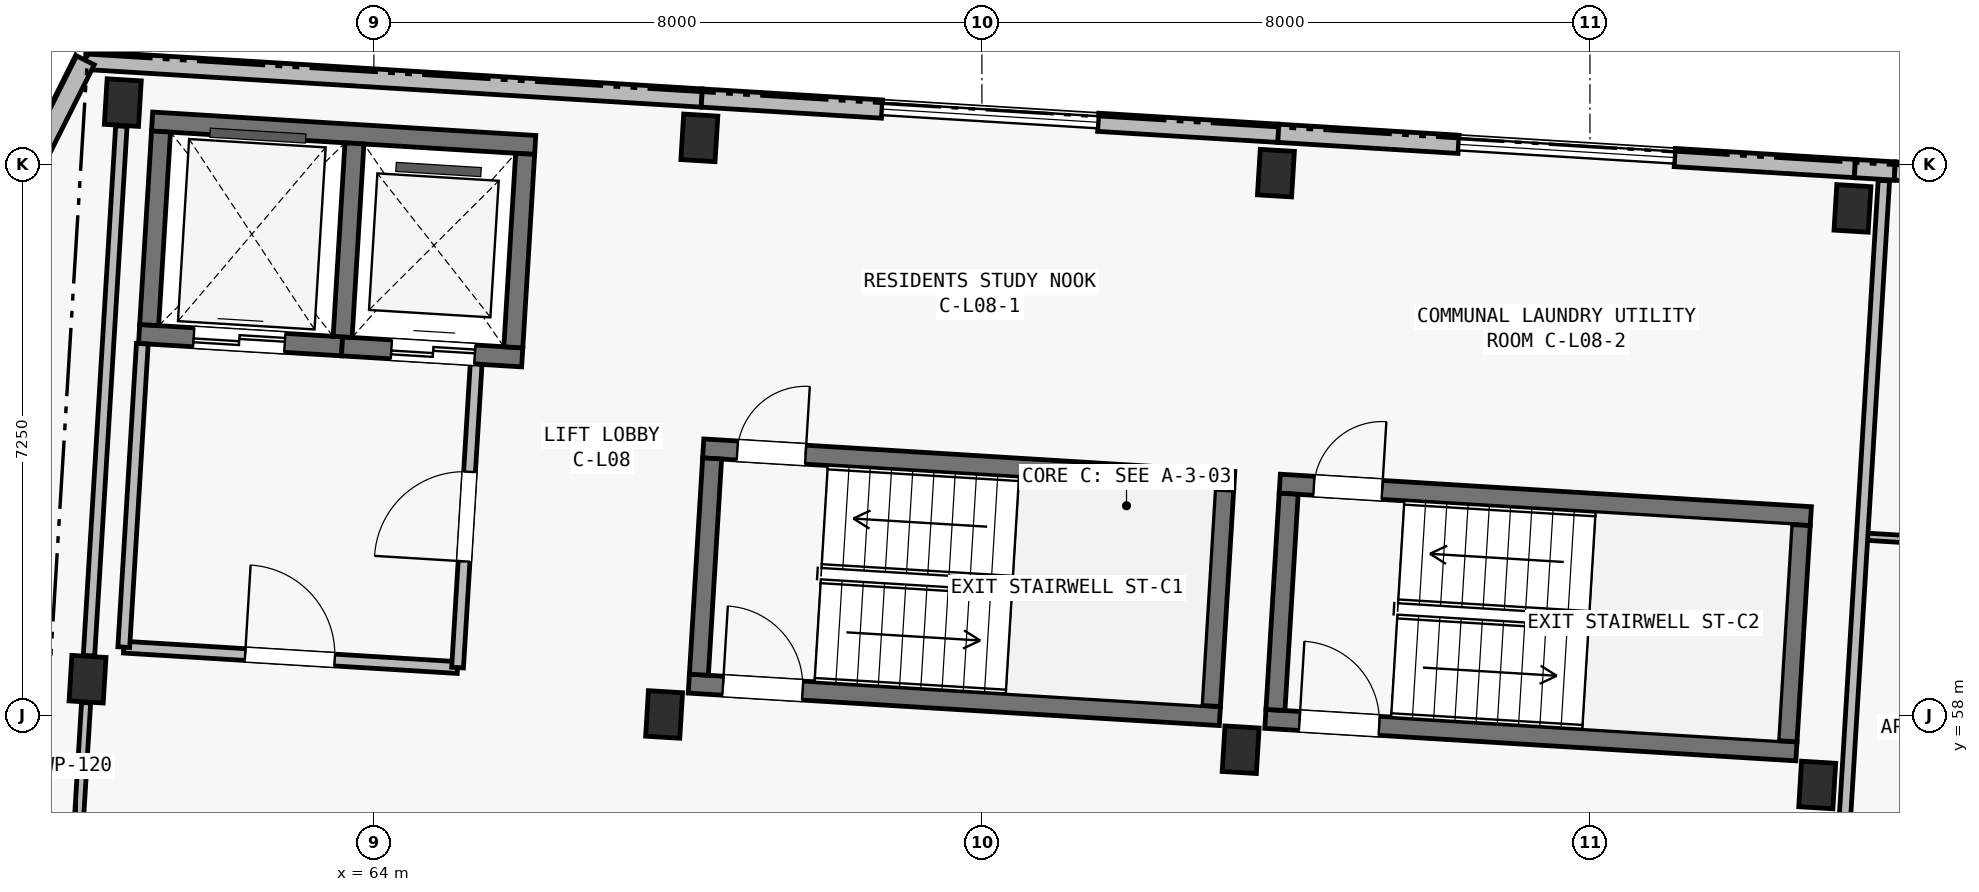
"""IFC4 building model, lengths in metres.
Left out: names, types, materials, properties, quantities, classifications, styles, units other than length and angle.
Written with IfcOpenShell. Run it as: python <this file> out.ifc"""

import sys

from ifc_helpers import new_model, si_unit, direction, frame, frame_2d, origin, origin_2d, place, context, subcontext, project, spatial, polyline, rectangle, outline, extrude, element, fill, save


model = new_model("IFC4")
c1 = context("Model", 3, precision=1e-05, world=origin(), true_north=direction((0.0, 1.0)))
c2 = subcontext(c1, "Body", "Model", "MODEL_VIEW")
j1 = project(units=[si_unit("LENGTHUNIT", "METRE"), si_unit("PLANEANGLEUNIT", "RADIAN")], contexts=[c1])
p1 = place(None, origin())
s1 = spatial("IfcSite", under=j1, at=p1, CompositionType="ELEMENT")
p2 = place(p1, origin())
s2 = spatial("IfcBuilding", under=s1, at=p2, CompositionType="ELEMENT")
p3 = place(p2, frame((0.0, 0.0, 27.9)))
s3 = spatial("IfcBuildingStorey", under=s2, at=p3, CompositionType="ELEMENT", Elevation=27.9)
for number, where, z_axis, x_axis in (
    (1, (60.233, 58.478, 0.0), (0.0, 0.0, 1.0), (0.998, -0.061, 0.0)),
    (2, (60.697, 66.063, 0.0), (0.0, 0.0, 1.0), (0.998, -0.061, 0.0)),
    (3, (67.818, 58.014, 0.0), (0.0, 0.0, 1.0), (0.998, -0.061, 0.0)),
    (4, (68.282, 65.599, 0.0), (0.0, 0.0, 1.0), (0.998, -0.061, 0.0)),
    (5, (75.404, 57.55, 0.0), (0.0, 0.0, 1.0), (0.998, -0.061, 0.0)),
    (6, (75.868, 65.135, 0.0), (0.0, 0.0, 1.0), (0.998, -0.061, 0.0)),
    (7, (82.99, 57.086, 0.0), (0.0, 0.0, 1.0), (0.998, -0.061, 0.0)),
    (8, (83.454, 64.672, 0.0), (0.0, 0.0, 1.0), (0.998, -0.061, 0.0)),
):
    element("IfcColumn", number, at=place(p3, frame(where, z_axis=z_axis, x_axis=x_axis)), inside=s3, PredefinedType="COLUMN", context=c2, shape_type="SweptSolid", body=[
        extrude(rectangle(XDim=0.45, YDim=0.6, at=origin_2d()), origin(), (0.0, 0.0, 1.0), 3.25),
    ])
p4 = place(p3, frame((61.082, 65.814, 0.0), z_axis=(0.0, 0.0, 1.0), x_axis=(0.998134101522, -0.061059932685, 0.0)))
e9 = element("IfcWall", 9, at=p4, inside=s3, PredefinedType="SHEAR", context=c2, shape_type="SweptSolid", body=[
    extrude(rectangle(XDim=5.05, YDim=0.25, at=frame_2d((2.525, 0.0))), origin(), (0.0, 0.0, 1.0), 3.25),
])
p5 = place(p3, frame((60.911, 63.02, 0.0), z_axis=(0.0, 0.0, 1.0), x_axis=(0.998134099905, -0.061059959111, 0.0)))
e10 = element("IfcWall", 10, at=p5, inside=s3, PredefinedType="SHEAR", context=c2, shape_type="SweptSolid", body=[
    extrude(rectangle(XDim=2.675, YDim=0.25, at=frame_2d((1.337, 0.0))), origin(), (0.0, 0.0, 1.0), 3.25),
])
p6 = place(p5, frame((0.72, 0.0, 0.0)))
e11 = element("IfcOpeningElement", 11, at=p6, cuts=e10, PredefinedType="OPENING", context=c2, shape_type="SweptSolid", body=[
    extrude(rectangle(XDim=1.2, YDim=2.2, at=frame_2d((0.6, 1.1))), frame((0.0, 0.14, 0.0), z_axis=(0.0, -1.0, 0.0), x_axis=(1.0, 0.0, 0.0)), (0.0, 0.0, 1.0), 0.28),
])
p7 = place(p3, frame((63.581, 62.856, 0.0), z_axis=(0.0, 0.0, 1.0), x_axis=(0.998134103342, -0.061059902923, 0.0)))
e12 = element("IfcWall", 12, at=p7, inside=s3, PredefinedType="SHEAR", context=c2, shape_type="SweptSolid", body=[
    extrude(rectangle(XDim=2.375, YDim=0.25, at=frame_2d((1.188, 0.0))), origin(), (0.0, 0.0, 1.0), 3.25),
])
p8 = place(p7, frame((0.65, 0.0, 0.0)))
e13 = element("IfcOpeningElement", 13, at=p8, cuts=e12, PredefinedType="OPENING", context=c2, shape_type="SweptSolid", body=[
    extrude(rectangle(XDim=1.1, YDim=2.15, at=frame_2d((0.55, 1.075))), frame((0.0, 0.14, 0.0), z_axis=(0.0, -1.0, 0.0), x_axis=(1.0, 0.0, 0.0)), (0.0, 0.0, 1.0), 0.28),
])
p9 = place(p3, frame((61.043, 63.137, 0.0), z_axis=(0.0, 0.0, 1.0), x_axis=(0.061078919587, 0.998132939834, 0.0)))
e14 = element("IfcWall", 14, at=p9, inside=s3, PredefinedType="SHEAR", context=c2, shape_type="SweptSolid", body=[
    extrude(rectangle(XDim=2.55, YDim=0.25, at=frame_2d((1.275, 0.0))), origin(), (0.0, 0.0, 1.0), 3.25),
])
p10 = place(p3, frame((63.589, 62.981, 0.0), z_axis=(0.0, 0.0, 1.0), x_axis=(0.060989368901, 0.998138415692, 0.0)))
e15 = element("IfcWall", 15, at=p10, inside=s3, PredefinedType="SHEAR", context=c2, shape_type="SweptSolid", body=[
    extrude(rectangle(XDim=2.55, YDim=0.25, at=frame_2d((1.275, 0.0))), origin(), (0.0, 0.0, 1.0), 3.25),
])
p11 = place(p3, frame((65.834, 62.844, 0.0), z_axis=(0.0, 0.0, 1.0), x_axis=(0.061084756616, 0.998132582631, 0.0)))
e16 = element("IfcWall", 16, at=p11, inside=s3, PredefinedType="SHEAR", context=c2, shape_type="SweptSolid", body=[
    extrude(rectangle(XDim=2.55, YDim=0.25, at=frame_2d((1.275, 0.0))), origin(), (0.0, 0.0, 1.0), 3.25),
])
p12 = place(p3, frame((68.333, 61.514, 0.0), z_axis=(0.0, 0.0, 1.0), x_axis=(0.998135676081, -0.061034188237, 0.0)))
e17 = element("IfcWall", 17, at=p12, inside=s3, PredefinedType="SHEAR", context=c2, shape_type="SweptSolid", body=[
    extrude(rectangle(XDim=7.0, YDim=0.25, at=frame_2d((3.5, 0.0))), origin(), (0.0, 0.0, 1.0), 3.25),
])
p13 = place(p12, frame((0.45, 0.0, 0.0)))
e18 = element("IfcOpeningElement", 18, at=p13, cuts=e17, PredefinedType="OPENING", context=c2, shape_type="SweptSolid", body=[
    extrude(rectangle(XDim=0.9, YDim=2.1, at=frame_2d((0.45, 1.05))), frame((0.0, 0.14, 0.0), z_axis=(0.0, -1.0, 0.0), x_axis=(1.0, 0.0, 0.0)), (0.0, 0.0, 1.0), 0.28),
])
p14 = place(p3, frame((68.144, 58.419, 0.0), z_axis=(0.0, 0.0, 1.0), x_axis=(0.998135546153, -0.061036313012, 0.0)))
e19 = element("IfcWall", 19, at=p14, inside=s3, PredefinedType="SHEAR", context=c2, shape_type="SweptSolid", body=[
    extrude(rectangle(XDim=7.0, YDim=0.25, at=frame_2d((3.5, 0.0))), origin(), (0.0, 0.0, 1.0), 3.25),
])
p15 = place(p14, frame((0.45, 0.0, 0.0)))
e20 = element("IfcOpeningElement", 20, at=p15, cuts=e19, PredefinedType="OPENING", context=c2, shape_type="SweptSolid", body=[
    extrude(rectangle(XDim=1.05, YDim=2.15, at=frame_2d((0.525, 1.075))), frame((0.0, 0.14, 0.0), z_axis=(0.0, -1.0, 0.0), x_axis=(1.0, 0.0, 0.0)), (0.0, 0.0, 1.0), 0.28),
])
for number, where, z_axis, x_axis in (
    (21, (68.276, 58.537, 0.0), (0.0, 0.0, 1.0), (0.061, 0.998, 0.0)),
    (22, (75.014, 58.125, 0.0), (0.0, 0.0, 1.0), (0.061, 0.998, 0.0)),
):
    element("IfcWall", number, at=place(p3, frame(where, z_axis=z_axis, x_axis=x_axis)), inside=s3, PredefinedType="SHEAR", context=c2, shape_type="SweptSolid", body=[
        extrude(rectangle(XDim=2.85, YDim=0.25, at=frame_2d((1.425, 0.0))), origin(), (0.0, 0.0, 1.0), 3.25),
    ])
p16 = place(p3, frame((75.919, 61.05, 0.0), z_axis=(0.0, 0.0, 1.0), x_axis=(0.998135546153, -0.061036313012, 0.0)))
e23 = element("IfcWall", 23, at=p16, inside=s3, PredefinedType="SHEAR", context=c2, shape_type="SweptSolid", body=[
    extrude(rectangle(XDim=7.0, YDim=0.25, at=frame_2d((3.5, 0.0))), origin(), (0.0, 0.0, 1.0), 3.25),
])
p17 = place(p16, frame((0.45, 0.0, 0.0)))
e24 = element("IfcOpeningElement", 24, at=p17, cuts=e23, PredefinedType="OPENING", context=c2, shape_type="SweptSolid", body=[
    extrude(rectangle(XDim=0.9, YDim=2.1, at=frame_2d((0.45, 1.05))), frame((0.0, 0.14, 0.0), z_axis=(0.0, -1.0, 0.0), x_axis=(1.0, 0.0, 0.0)), (0.0, 0.0, 1.0), 0.28),
])
p18 = place(p3, frame((75.73, 57.956, 0.0), z_axis=(0.0, 0.0, 1.0), x_axis=(0.998135546153, -0.061036313012, 0.0)))
e25 = element("IfcWall", 25, at=p18, inside=s3, PredefinedType="SHEAR", context=c2, shape_type="SweptSolid", body=[
    extrude(rectangle(XDim=7.0, YDim=0.25, at=frame_2d((3.5, 0.0))), origin(), (0.0, 0.0, 1.0), 3.25),
])
p19 = place(p18, frame((0.45, 0.0, 0.0)))
e26 = element("IfcOpeningElement", 26, at=p19, cuts=e25, PredefinedType="OPENING", context=c2, shape_type="SweptSolid", body=[
    extrude(rectangle(XDim=1.05, YDim=2.15, at=frame_2d((0.525, 1.075))), frame((0.0, 0.14, 0.0), z_axis=(0.0, -1.0, 0.0), x_axis=(1.0, 0.0, 0.0)), (0.0, 0.0, 1.0), 0.28),
])
for number, where, z_axis, x_axis in (
    (27, (75.862, 58.073, 0.0), (0.0, 0.0, 1.0), (0.061, 0.998, 0.0)),
    (28, (82.599, 57.661, 0.0), (0.0, 0.0, 1.0), (0.061, 0.998, 0.0)),
):
    element("IfcWall", number, at=place(p3, frame(where, z_axis=z_axis, x_axis=x_axis)), inside=s3, PredefinedType="SHEAR", context=c2, shape_type="SweptSolid", body=[
        extrude(rectangle(XDim=2.85, YDim=0.25, at=frame_2d((1.425, 0.0))), origin(), (0.0, 0.0, 1.0), 3.25),
    ])
p20 = place(p3, frame((60.205, 66.62, 0.0), z_axis=(0.0, 0.0, 1.0), x_axis=(0.998134248939, -0.061057522844, 0.0)))
e29 = element("IfcWall", 29, at=p20, inside=s3, PredefinedType="SOLIDWALL", context=c2, shape_type="SweptSolid", body=[
    extrude(rectangle(XDim=8.125, YDim=0.24, at=frame_2d((4.062, 0.0))), origin(), (0.0, 0.0, 1.0), 3.0),
])
p21 = place(p3, frame((68.314, 66.124, 0.0), z_axis=(0.0, 0.0, 1.0), x_axis=(0.998134103342, -0.061059902923, 0.0)))
e30 = element("IfcWall", 30, at=p21, inside=s3, PredefinedType="SOLIDWALL", context=c2, shape_type="SweptSolid", body=[
    extrude(rectangle(XDim=2.375, YDim=0.24, at=frame_2d((1.188, 0.0))), origin(), (0.0, 0.0, 1.0), 3.0),
])
p22 = place(p3, frame((73.53, 65.804, 0.0), z_axis=(0.0, 0.0, 1.0), x_axis=(0.998133720034, -0.061066168473, 0.0)))
e31 = element("IfcWall", 31, at=p22, inside=s3, PredefinedType="SOLIDWALL", context=c2, shape_type="SweptSolid", body=[
    extrude(rectangle(XDim=2.375, YDim=0.24, at=frame_2d((1.188, 0.0))), origin(), (0.0, 0.0, 1.0), 3.0),
])
for number, where, z_axis, x_axis in (
    (32, (75.9, 65.659, 0.0), (0.0, 0.0, 1.0), (0.998, -0.061, 0.0)),
    (33, (81.115, 65.341, 0.0), (0.0, 0.0, 1.0), (0.998, -0.061, 0.0)),
):
    element("IfcWall", number, at=place(p3, frame(where, z_axis=z_axis, x_axis=x_axis)), inside=s3, PredefinedType="SOLIDWALL", context=c2, shape_type="SweptSolid", body=[
        extrude(rectangle(XDim=2.375, YDim=0.24, at=frame_2d((1.188, 0.0))), origin(), (0.0, 0.0, 1.0), 3.0),
    ])
p23 = place(p3, frame((83.486, 65.196, 0.0), z_axis=(0.0, 0.0, 1.0), x_axis=(0.998142018096, -0.060930384143, 0.0)))
e34 = element("IfcWall", 34, at=p23, inside=s3, PredefinedType="SOLIDWALL", context=c2, shape_type="SweptSolid", body=[
    extrude(rectangle(XDim=0.525, YDim=0.24, at=frame_2d((0.262, 0.0))), origin(), (0.0, 0.0, 1.0), 3.0),
])
p24 = place(p3, frame((84.01, 65.164, 0.0), z_axis=(0.0, 0.0, 1.0), x_axis=(0.998135197798, -0.061042009435, 0.0)))
e35 = element("IfcWall", 35, at=p24, inside=s3, PredefinedType="SOLIDWALL", context=c2, shape_type="SweptSolid", body=[
    extrude(outline(polyline([(0.0, 0.0), (7.075, 0.0), (7.075, 4.861), (0.0, 6.222), (0.0, 0.0)])), frame((0.0, 0.12, 0.0), z_axis=(0.0, -1.0, 0.0), x_axis=(1.0, 0.0, 0.0)), (0.0, 0.0, 1.0), 0.24),
])
p25 = place(p24, frame((1.282, 0.0, 0.5)))
e36 = element("IfcOpeningElement", 36, at=p25, cuts=e35, PredefinedType="OPENING", context=c2, shape_type="SweptSolid", body=[
    extrude(rectangle(XDim=0.74, YDim=2.26, at=frame_2d((0.37, 1.13))), frame((0.0, 0.135, 0.0), z_axis=(0.0, -1.0, 0.0), x_axis=(1.0, 0.0, 0.0)), (0.0, 0.0, 1.0), 0.27),
])
p26 = place(p24, frame((4.481, 0.0, 0.44)))
e37 = element("IfcOpeningElement", 37, at=p26, cuts=e35, PredefinedType="OPENING", context=c2, shape_type="SweptSolid", body=[
    extrude(rectangle(XDim=0.82, YDim=2.18, at=frame_2d((0.41, 1.09))), frame((0.0, 0.135, 0.0), z_axis=(0.0, -1.0, 0.0), x_axis=(1.0, 0.0, 0.0)), (0.0, 0.0, 1.0), 0.27),
])
p27 = place(p3, frame((51.654, 49.585, 0.0), z_axis=(0.0, 0.0, 1.0), x_axis=(0.448621989068, 0.893721607059, 0.0)))
e38 = element("IfcWall", 38, at=p27, inside=s3, PredefinedType="SOLIDWALL", context=c2, shape_type="SweptSolid", body=[
    extrude(rectangle(XDim=19.061, YDim=0.26, at=frame_2d((9.53, 0.0))), origin(), (0.0, 0.0, 1.0), 3.0),
])
p28 = place(p27, frame((2.45, 0.0, 0.45)))
e39 = element("IfcOpeningElement", 39, at=p28, cuts=e38, PredefinedType="OPENING", context=c2, shape_type="SweptSolid", body=[
    extrude(rectangle(XDim=0.7, YDim=2.36, at=frame_2d((0.35, 1.18))), frame((0.0, 0.145, 0.0), z_axis=(0.0, -1.0, 0.0), x_axis=(1.0, 0.0, 0.0)), (0.0, 0.0, 1.0), 0.29),
])
p29 = place(p27, frame((15.771, 0.0, 0.52)))
e40 = element("IfcOpeningElement", 40, at=p29, cuts=e38, PredefinedType="OPENING", context=c2, shape_type="SweptSolid", body=[
    extrude(rectangle(XDim=0.84, YDim=2.28, at=frame_2d((0.42, 1.14))), frame((0.0, 0.145, 0.0), z_axis=(0.0, -1.0, 0.0), x_axis=(1.0, 0.0, 0.0)), (0.0, 0.0, 1.0), 0.29),
])
p30 = place(p3, frame((60.709, 58.899, 0.0), z_axis=(0.0, 0.0, 1.0), x_axis=(0.998132276607, -0.061089756882, 0.0)))
e41 = element("IfcWall", 41, at=p30, inside=s3, PredefinedType="PARTITIONING", context=c2, shape_type="SweptSolid", body=[
    extrude(rectangle(XDim=4.4, YDim=0.155, at=frame_2d((2.2, 0.0))), origin(), (0.0, 0.0, 1.0), 2.97),
])
p31 = place(p30, frame((1.6, 0.0, 0.0)))
e42 = element("IfcOpeningElement", 42, at=p31, cuts=e41, PredefinedType="OPENING", context=c2, shape_type="SweptSolid", body=[
    extrude(rectangle(XDim=1.18, YDim=2.15, at=frame_2d((0.59, 1.075))), frame((0.0, 0.093, 0.0), z_axis=(0.0, -1.0, 0.0), x_axis=(1.0, 0.0, 0.0)), (0.0, 0.0, 1.0), 0.185),
])
p32 = place(p3, frame((60.709, 58.899, 0.0), z_axis=(0.0, 0.0, 1.0), x_axis=(0.061036844229, 0.998135513669, 0.0)))
e43 = element("IfcWall", 43, at=p32, inside=s3, PredefinedType="PARTITIONING", context=c2, shape_type="SweptSolid", body=[
    extrude(rectangle(XDim=4.0, YDim=0.155, at=frame_2d((2.0, 0.0))), origin(), (0.0, 0.0, 1.0), 2.97),
])
p33 = place(p3, frame((65.101, 58.631, 0.0), z_axis=(0.0, 0.0, 1.0), x_axis=(0.061033125904, 0.99813574104, 0.0)))
e44 = element("IfcWall", 44, at=p33, inside=s3, PredefinedType="PARTITIONING", context=c2, shape_type="SweptSolid", body=[
    extrude(rectangle(XDim=4.0, YDim=0.155, at=frame_2d((2.0, 0.0))), origin(), (0.0, 0.0, 1.0), 2.97),
])
p34 = place(p33, frame((1.4, 0.0, 0.0)))
e45 = element("IfcOpeningElement", 45, at=p34, cuts=e44, PredefinedType="OPENING", context=c2, shape_type="SweptSolid", body=[
    extrude(rectangle(XDim=1.18, YDim=2.15, at=frame_2d((0.59, 1.075))), frame((0.0, 0.093, 0.0), z_axis=(0.0, -1.0, 0.0), x_axis=(1.0, 0.0, 0.0)), (0.0, 0.0, 1.0), 0.185),
])
p35 = place(p3, frame((59.983, 54.395, 0.0), z_axis=(0.0, 0.0, 1.0), x_axis=(0.061035211258, 0.998135613525, 0.0)))
e46 = element("IfcWall", 46, at=p35, inside=s3, PredefinedType="PARTITIONING", context=c2, shape_type="SweptSolid", body=[
    extrude(rectangle(XDim=3.78, YDim=0.12, at=frame_2d((1.89, 0.0))), origin(), (0.0, 0.0, 1.0), 2.5),
])
p36 = place(p35, frame((1.35, 0.0, 0.0)))
e47 = element("IfcOpeningElement", 47, at=p36, cuts=e46, PredefinedType="OPENING", context=c2, shape_type="SweptSolid", body=[
    extrude(rectangle(XDim=0.88, YDim=2.1, at=frame_2d((0.44, 1.05))), frame((0.0, 0.075, 0.0), z_axis=(0.0, -1.0, 0.0), x_axis=(1.0, 0.0, 0.0)), (0.0, 0.0, 1.0), 0.15),
])
p37 = place(p3, frame((60.251, 58.787, 0.0), z_axis=(0.0, 0.0, 1.0), x_axis=(0.061071659957, 0.998133384047, 0.0)))
e48 = element("IfcWall", 48, at=p37, inside=s3, PredefinedType="PARTITIONING", context=c2, shape_type="SweptSolid", body=[
    extrude(rectangle(XDim=6.98, YDim=0.15, at=frame_2d((3.49, 0.0))), origin(), (0.0, 0.0, 1.0), 2.5),
])
p38 = place(p3, frame((83.581, 60.356, 0.0), z_axis=(0.0, 0.0, 1.0), x_axis=(0.998133350094, -0.061072214879, 0.0)))
e49 = element("IfcWall", 49, at=p38, inside=s3, PredefinedType="PARTITIONING", context=c2, shape_type="SweptSolid", body=[
    extrude(rectangle(XDim=3.41, YDim=0.095, at=frame_2d((1.705, 0.0))), origin(), (0.0, 0.0, 1.0), 2.97),
])
p39 = place(p38, frame((1.255, 0.0, 0.0)))
e50 = element("IfcOpeningElement", 50, at=p39, cuts=e49, PredefinedType="OPENING", context=c2, shape_type="SweptSolid", body=[
    extrude(rectangle(XDim=0.9, YDim=2.1, at=frame_2d((0.45, 1.05))), frame((0.0, 0.062, 0.0), z_axis=(0.0, -1.0, 0.0), x_axis=(1.0, 0.0, 0.0)), (0.0, 0.0, 1.0), 0.125),
])
p40 = place(p3, frame((83.265, 55.185, 0.0), z_axis=(0.0, 0.0, 1.0), x_axis=(0.061046193261, 0.998134941923, 0.0)))
e51 = element("IfcWall", 51, at=p40, inside=s3, PredefinedType="PARTITIONING", context=c2, shape_type="SweptSolid", body=[
    extrude(rectangle(XDim=9.87, YDim=0.15, at=frame_2d((4.935, 0.0))), origin(), (0.0, 0.0, 1.0), 2.97),
])
p41 = place(p31, origin())
e52 = element("IfcDoor", 52, at=p41, inside=s3, OperationType="SINGLE_SWING_LEFT", PredefinedType="DOOR", context=c2, shape_type="SweptSolid", body=[
    extrude(rectangle(XDim=1.18, YDim=2.15, at=frame_2d((0.59, 1.075))), frame((0.0, 0.025, 0.0), z_axis=(0.0, -1.0, 0.0), x_axis=(1.0, 0.0, 0.0)), (0.0, 0.0, 1.0), 0.05),
])
fill(e42, e52)
p42 = place(p34, origin())
e53 = element("IfcDoor", 53, at=p42, inside=s3, OperationType="SINGLE_SWING_LEFT", PredefinedType="DOOR", context=c2, shape_type="SweptSolid", body=[
    extrude(rectangle(XDim=1.18, YDim=2.15, at=frame_2d((0.59, 1.075))), frame((0.0, 0.025, 0.0), z_axis=(0.0, -1.0, 0.0), x_axis=(1.0, 0.0, 0.0)), (0.0, 0.0, 1.0), 0.05),
])
fill(e45, e53)
p43 = place(p15, origin())
e54 = element("IfcDoor", 54, at=p43, inside=s3, OperationType="SINGLE_SWING_LEFT", PredefinedType="DOOR", context=c2, shape_type="SweptSolid", body=[
    extrude(rectangle(XDim=1.05, YDim=2.15, at=frame_2d((0.525, 1.075))), frame((0.0, 0.025, 0.0), z_axis=(0.0, -1.0, 0.0), x_axis=(1.0, 0.0, 0.0)), (0.0, 0.0, 1.0), 0.05),
])
fill(e20, e54)
p44 = place(p13, origin())
e55 = element("IfcDoor", 55, at=p44, inside=s3, OperationType="SINGLE_SWING_RIGHT", PredefinedType="DOOR", context=c2, shape_type="SweptSolid", body=[
    extrude(rectangle(XDim=0.9, YDim=2.1, at=frame_2d((0.45, 1.05))), frame((0.0, 0.025, 0.0), z_axis=(0.0, -1.0, 0.0), x_axis=(1.0, 0.0, 0.0)), (0.0, 0.0, 1.0), 0.05),
])
fill(e18, e55)
p45 = place(p19, origin())
e56 = element("IfcDoor", 56, at=p45, inside=s3, OperationType="SINGLE_SWING_LEFT", PredefinedType="DOOR", context=c2, shape_type="SweptSolid", body=[
    extrude(rectangle(XDim=1.05, YDim=2.15, at=frame_2d((0.525, 1.075))), frame((0.0, 0.025, 0.0), z_axis=(0.0, -1.0, 0.0), x_axis=(1.0, 0.0, 0.0)), (0.0, 0.0, 1.0), 0.05),
])
fill(e26, e56)
p46 = place(p17, origin())
e57 = element("IfcDoor", 57, at=p46, inside=s3, OperationType="SINGLE_SWING_RIGHT", PredefinedType="DOOR", context=c2, shape_type="SweptSolid", body=[
    extrude(rectangle(XDim=0.9, YDim=2.1, at=frame_2d((0.45, 1.05))), frame((0.0, 0.025, 0.0), z_axis=(0.0, -1.0, 0.0), x_axis=(1.0, 0.0, 0.0)), (0.0, 0.0, 1.0), 0.05),
])
fill(e24, e57)
p47 = place(p6, origin())
e58 = element("IfcDoor", 58, at=p47, inside=s3, OperationType="DOUBLE_DOOR_SLIDING", PredefinedType="DOOR", context=c2, shape_type="SweptSolid", body=[
    extrude(rectangle(XDim=1.2, YDim=2.2, at=frame_2d((0.6, 1.1))), frame((0.0, 0.025, 0.0), z_axis=(0.0, -1.0, 0.0), x_axis=(1.0, 0.0, 0.0)), (0.0, 0.0, 1.0), 0.05),
])
fill(e11, e58)
p48 = place(p8, origin())
e59 = element("IfcDoor", 59, at=p48, inside=s3, OperationType="DOUBLE_DOOR_SLIDING", PredefinedType="DOOR", context=c2, shape_type="SweptSolid", body=[
    extrude(rectangle(XDim=1.1, YDim=2.15, at=frame_2d((0.55, 1.075))), frame((0.0, 0.025, 0.0), z_axis=(0.0, -1.0, 0.0), x_axis=(1.0, 0.0, 0.0)), (0.0, 0.0, 1.0), 0.05),
])
fill(e13, e59)
save(model, sys.argv[1])
